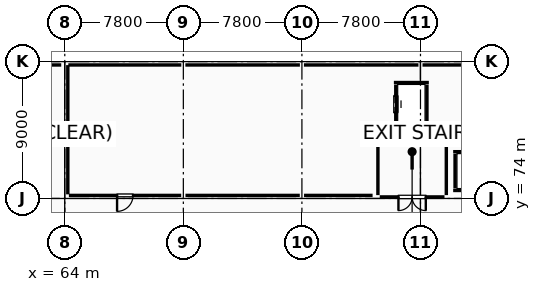
"""IFC4 building model, lengths in metres.
Left out: names, types, materials, properties, quantities, classifications, styles, units other than length and angle.
Written with IfcOpenShell. Run it as: python <this file> out.ifc"""

import sys

from ifc_helpers import new_model, si_unit, direction, frame, frame_2d, origin, origin_2d, place, context, subcontext, project, spatial, rectangle, hollow_rectangle, i_section, extrude, element, fill, save


model = new_model("IFC4")
c1 = context("Model", 3, precision=1e-05, world=origin(), true_north=direction((0.0, 1.0)))
c2 = subcontext(c1, "Body", "Model", "MODEL_VIEW")
j1 = project(units=[si_unit("LENGTHUNIT", "METRE"), si_unit("PLANEANGLEUNIT", "RADIAN")], contexts=[c1])
p1 = place(None, origin())
s1 = spatial("IfcSite", under=j1, at=p1, CompositionType="ELEMENT")
p2 = place(p1, origin())
s2 = spatial("IfcBuilding", under=s1, at=p2, CompositionType="ELEMENT")
p3 = place(p2, frame((0.0, 0.0, 15.0)))
s3 = spatial("IfcBuildingStorey", under=s2, at=p3, CompositionType="ELEMENT", Elevation=15.0)
p4 = place(p3, frame((64.0, 74.0, 0.0), z_axis=(0.0, 0.0, 1.0), x_axis=(1.0, 0.0, 0.0)))
e1 = element("IfcColumn", 1, at=p4, inside=s3, PredefinedType="COLUMN", context=c2, shape_type="SweptSolid", body=[
    extrude(i_section(OverallWidth=0.25, OverallDepth=0.45, WebThickness=0.011, FlangeThickness=0.014, FilletRadius=0.015, at=origin_2d()), origin(), (0.0, 0.0, 1.0), 4.8),
])
p5 = place(p3, frame((64.0, 83.0, 0.0), z_axis=(0.0, 0.0, 1.0), x_axis=(1.0, 0.0, 0.0)))
e2 = element("IfcColumn", 2, at=p5, inside=s3, PredefinedType="COLUMN", context=c2, shape_type="SweptSolid", body=[
    extrude(hollow_rectangle(XDim=0.45, YDim=0.45, WallThickness=0.02, at=origin_2d()), origin(), (0.0, 0.0, 1.0), 4.8),
])
for number, where, z_axis, x_axis in (
    (3, (71.8, 74.0, 0.0), (0.0, 0.0, 1.0), (1.0, 0.0, 0.0)),
    (4, (71.8, 83.0, 0.0), (0.0, 0.0, 1.0), (1.0, 0.0, 0.0)),
    (5, (79.6, 74.0, 0.0), (0.0, 0.0, 1.0), (1.0, 0.0, 0.0)),
    (6, (79.6, 83.0, 0.0), (0.0, 0.0, 1.0), (1.0, 0.0, 0.0)),
    (7, (87.4, 83.0, 0.0), (0.0, 0.0, 1.0), (1.0, 0.0, 0.0)),
):
    element("IfcColumn", number, at=place(p3, frame(where, z_axis=z_axis, x_axis=x_axis)), inside=s3, PredefinedType="COLUMN", context=c2, shape_type="SweptSolid", body=[
        extrude(i_section(OverallWidth=0.25, OverallDepth=0.45, WebThickness=0.011, FlangeThickness=0.014, FilletRadius=0.015, at=origin_2d()), origin(), (0.0, 0.0, 1.0), 4.8),
    ])
p6 = place(p3, frame((62.804, 82.78, 0.0), z_axis=(0.0, 0.0, 1.0), x_axis=(1.0, 0.0, 0.0)))
e8 = element("IfcWall", 8, at=p6, inside=s3, PredefinedType="STANDARD", context=c2, shape_type="SweptSolid", body=[
    extrude(rectangle(XDim=0.963, YDim=0.4, at=frame_2d((0.481, 0.0))), origin(), (0.0, 0.0, 1.0), 4.55),
])
p7 = place(p3, frame((64.233, 82.78, 0.0), z_axis=(0.0, 0.0, 1.0), x_axis=(1.0, 0.0, 0.0)))
e9 = element("IfcWall", 9, at=p7, inside=s3, PredefinedType="STANDARD", context=c2, shape_type="SweptSolid", body=[
    extrude(rectangle(XDim=7.434, YDim=0.4, at=frame_2d((3.717, 0.0))), origin(), (0.0, 0.0, 1.0), 3.685),
])
p8 = place(p3, frame((71.933, 82.78, 0.0), z_axis=(0.0, 0.0, 1.0), x_axis=(1.0, 0.0, 0.0)))
e10 = element("IfcWall", 10, at=p8, inside=s3, PredefinedType="STANDARD", context=c2, shape_type="SweptSolid", body=[
    extrude(rectangle(XDim=7.534, YDim=0.4, at=frame_2d((3.767, 0.0))), origin(), (0.0, 0.0, 1.0), 3.785),
])
p9 = place(p3, frame((79.733, 82.78, 0.0), z_axis=(0.0, 0.0, 1.0), x_axis=(1.0, 0.0, 0.0)))
e11 = element("IfcWall", 11, at=p9, inside=s3, PredefinedType="STANDARD", context=c2, shape_type="SweptSolid", body=[
    extrude(rectangle(XDim=7.534, YDim=0.4, at=frame_2d((3.767, 0.0))), origin(), (0.0, 0.0, 1.0), 3.885),
])
p10 = place(p3, frame((87.533, 82.78, 0.0), z_axis=(0.0, 0.0, 1.0), x_axis=(1.0, 0.0, 0.0)))
e12 = element("IfcWall", 12, at=p10, inside=s3, PredefinedType="STANDARD", context=c2, shape_type="SweptSolid", body=[
    extrude(rectangle(XDim=5.863, YDim=0.4, at=frame_2d((2.932, 0.0))), origin(), (0.0, 0.0, 1.0), 4.55),
])
p11 = place(p3, frame((89.55, 74.525, 0.0), z_axis=(0.0, 0.0, 1.0), x_axis=(1.0, 0.0, 0.0)))
e13 = element("IfcWall", 13, at=p11, inside=s3, PredefinedType="STANDARD", context=c2, shape_type="SweptSolid", body=[
    extrude(rectangle(XDim=2.5, YDim=0.25, at=frame_2d((1.25, 0.0))), origin(), (0.0, 0.0, 1.0), 4.54),
])
p12 = place(p11, frame((0.65, 0.0, 0.0)))
e14 = element("IfcOpeningElement", 14, at=p12, cuts=e13, PredefinedType="OPENING", context=c2, shape_type="SweptSolid", body=[
    extrude(rectangle(XDim=1.2, YDim=2.05, at=frame_2d((0.6, 1.025))), frame((0.0, 0.135, 0.0), z_axis=(0.0, -1.0, 0.0), x_axis=(1.0, 0.0, 0.0)), (0.0, 0.0, 1.0), 0.27),
])
p13 = place(p3, frame((92.05, 77.075, 0.0), z_axis=(0.0, 0.0, 1.0), x_axis=(-1.0, 0.0, 0.0)))
e15 = element("IfcWall", 15, at=p13, inside=s3, PredefinedType="STANDARD", context=c2, shape_type="SweptSolid", body=[
    extrude(rectangle(XDim=2.5, YDim=0.25, at=frame_2d((1.25, 0.0))), origin(), (0.0, 0.0, 1.0), 4.54),
])
p14 = place(p3, frame((89.675, 76.94, 0.0), z_axis=(0.0, 0.0, 1.0), x_axis=(0.0, -1.0, 0.0)))
e16 = element("IfcWall", 16, at=p14, inside=s3, PredefinedType="STANDARD", context=c2, shape_type="SweptSolid", body=[
    extrude(rectangle(XDim=2.28, YDim=0.25, at=frame_2d((1.14, 0.0))), origin(), (0.0, 0.0, 1.0), 4.54),
])
for number, where, z_axis, x_axis in (
    (17, (85.65, 78.775, 0.0), (0.0, 0.0, 1.0), (1.0, 0.0, 0.0)),
    (18, (87.95, 81.625, 0.0), (0.0, 0.0, 1.0), (-1.0, 0.0, 0.0)),
):
    element("IfcWall", number, at=place(p3, frame(where, z_axis=z_axis, x_axis=x_axis)), inside=s3, PredefinedType="STANDARD", context=c2, shape_type="SweptSolid", body=[
        extrude(rectangle(XDim=2.3, YDim=0.25, at=frame_2d((1.15, 0.0))), origin(), (0.0, 0.0, 1.0), 4.54),
    ])
p15 = place(p3, frame((87.825, 78.91, 0.0), z_axis=(0.0, 0.0, 1.0), x_axis=(0.0, 1.0, 0.0)))
e19 = element("IfcWall", 19, at=p15, inside=s3, PredefinedType="STANDARD", context=c2, shape_type="SweptSolid", body=[
    extrude(rectangle(XDim=2.58, YDim=0.25, at=frame_2d((1.29, 0.0))), origin(), (0.0, 0.0, 1.0), 4.54),
])
p16 = place(p3, frame((85.775, 81.49, 0.0), z_axis=(0.0, 0.0, 1.0), x_axis=(0.0, -1.0, 0.0)))
e20 = element("IfcWall", 20, at=p16, inside=s3, PredefinedType="STANDARD", context=c2, shape_type="SweptSolid", body=[
    extrude(rectangle(XDim=2.58, YDim=0.25, at=frame_2d((1.29, 0.0))), origin(), (0.0, 0.0, 1.0), 4.54),
])
p17 = place(p16, frame((0.74, 0.0, 0.0)))
e21 = element("IfcOpeningElement", 21, at=p17, cuts=e20, PredefinedType="OPENING", context=c2, shape_type="SweptSolid", body=[
    extrude(rectangle(XDim=1.1, YDim=2.15, at=frame_2d((0.55, 1.075))), frame((0.0, 0.135, 0.0), z_axis=(0.0, -1.0, 0.0), x_axis=(1.0, 0.0, 0.0)), (0.0, 0.0, 1.0), 0.27),
])
p18 = place(p3, frame((84.6, 74.22, 0.0), z_axis=(0.0, 0.0, 1.0), x_axis=(0.0, 1.0, 0.0)))
e22 = element("IfcWall", 22, at=p18, inside=s3, PredefinedType="PARTITIONING", context=c2, shape_type="SweptSolid", body=[
    extrude(rectangle(XDim=3.36, YDim=0.2, at=frame_2d((1.68, 0.0))), origin(), (0.0, 0.0, 1.0), 4.54),
])
p19 = place(p3, frame((84.72, 77.7, 0.0), z_axis=(0.0, 0.0, 1.0), x_axis=(1.0, 0.0, 0.0)))
e23 = element("IfcWall", 23, at=p19, inside=s3, PredefinedType="PARTITIONING", context=c2, shape_type="SweptSolid", body=[
    extrude(rectangle(XDim=4.26, YDim=0.2, at=frame_2d((2.13, 0.0))), origin(), (0.0, 0.0, 1.0), 4.54),
])
p20 = place(p3, frame((89.1, 77.58, 0.0), z_axis=(0.0, 0.0, 1.0), x_axis=(0.0, -1.0, 0.0)))
e24 = element("IfcWall", 24, at=p20, inside=s3, PredefinedType="PARTITIONING", context=c2, shape_type="SweptSolid", body=[
    extrude(rectangle(XDim=3.36, YDim=0.2, at=frame_2d((1.68, 0.0))), origin(), (0.0, 0.0, 1.0), 4.54),
])
p21 = place(p3, frame((88.98, 74.1, 0.0), z_axis=(0.0, 0.0, 1.0), x_axis=(-1.0, 0.0, 0.0)))
e25 = element("IfcWall", 25, at=p21, inside=s3, PredefinedType="PARTITIONING", context=c2, shape_type="SweptSolid", body=[
    extrude(rectangle(XDim=4.26, YDim=0.2, at=frame_2d((2.13, 0.0))), origin(), (0.0, 0.0, 1.0), 4.54),
])
p22 = place(p21, frame((1.23, 0.0, 0.0)))
e26 = element("IfcOpeningElement", 26, at=p22, cuts=e25, PredefinedType="OPENING", context=c2, shape_type="SweptSolid", body=[
    extrude(rectangle(XDim=1.8, YDim=2.15, at=frame_2d((0.9, 1.075))), frame((0.0, 0.11, 0.0), z_axis=(0.0, -1.0, 0.0), x_axis=(1.0, 0.0, 0.0)), (0.0, 0.0, 1.0), 0.22),
])
p23 = place(p3, frame((64.2, 74.27, 0.0), z_axis=(0.0, 0.0, 1.0), x_axis=(0.0, 1.0, 0.0)))
e27 = element("IfcWall", 27, at=p23, inside=s3, PredefinedType="PARTITIONING", context=c2, shape_type="SweptSolid", body=[
    extrude(rectangle(XDim=8.501, YDim=0.1, at=frame_2d((4.25, 0.0))), origin(), (0.0, 0.0, 1.0), 4.08),
])
p24 = place(p3, frame((84.25, 74.2, 0.0), z_axis=(0.0, 0.0, 1.0), x_axis=(-1.0, 0.0, 0.0)))
e28 = element("IfcWall", 28, at=p24, inside=s3, PredefinedType="PARTITIONING", context=c2, shape_type="SweptSolid", body=[
    extrude(rectangle(XDim=4.51, YDim=0.1, at=frame_2d((2.255, 0.0))), origin(), (0.0, 0.0, 1.0), 4.54),
])
p25 = place(p3, frame((79.46, 74.2, 0.0), z_axis=(0.0, 0.0, 1.0), x_axis=(-1.0, 0.0, 0.0)))
e29 = element("IfcWall", 29, at=p25, inside=s3, PredefinedType="PARTITIONING", context=c2, shape_type="SweptSolid", body=[
    extrude(rectangle(XDim=7.52, YDim=0.1, at=frame_2d((3.76, 0.0))), origin(), (0.0, 0.0, 1.0), 4.08),
])
p26 = place(p3, frame((71.66, 74.2, 0.0), z_axis=(0.0, 0.0, 1.0), x_axis=(-1.0, 0.0, 0.0)))
e30 = element("IfcWall", 30, at=p26, inside=s3, PredefinedType="PARTITIONING", context=c2, shape_type="SweptSolid", body=[
    extrude(rectangle(XDim=7.39, YDim=0.1, at=frame_2d((3.695, 0.0))), origin(), (0.0, 0.0, 1.0), 4.03),
])
p27 = place(p26, frame((3.17, 0.0, 0.0)))
e31 = element("IfcOpeningElement", 31, at=p27, cuts=e30, PredefinedType="OPENING", context=c2, shape_type="SweptSolid", body=[
    extrude(rectangle(XDim=1.05, YDim=2.15, at=frame_2d((0.525, 1.075))), frame((0.0, 0.06, 0.0), z_axis=(0.0, -1.0, 0.0), x_axis=(1.0, 0.0, 0.0)), (0.0, 0.0, 1.0), 0.12),
])
p28 = place(p17, origin())
e32 = element("IfcDoor", 32, at=p28, inside=s3, OperationType="DOUBLE_DOOR_SLIDING", PredefinedType="DOOR", context=c2, shape_type="SweptSolid", body=[
    extrude(rectangle(XDim=1.1, YDim=2.15, at=frame_2d((0.55, 1.075))), frame((0.0, 0.025, 0.0), z_axis=(0.0, -1.0, 0.0), x_axis=(1.0, 0.0, 0.0)), (0.0, 0.0, 1.0), 0.05),
])
fill(e21, e32)
p29 = place(p22, origin())
e33 = element("IfcDoor", 33, at=p29, inside=s3, OperationType="DOUBLE_DOOR_SINGLE_SWING", PredefinedType="DOOR", context=c2, shape_type="SweptSolid", body=[
    extrude(rectangle(XDim=1.8, YDim=2.15, at=frame_2d((0.9, 1.075))), frame((0.0, 0.025, 0.0), z_axis=(0.0, -1.0, 0.0), x_axis=(1.0, 0.0, 0.0)), (0.0, 0.0, 1.0), 0.05),
])
fill(e26, e33)
p30 = place(p27, origin())
e34 = element("IfcDoor", 34, at=p30, inside=s3, OperationType="SINGLE_SWING_RIGHT", PredefinedType="DOOR", context=c2, shape_type="SweptSolid", body=[
    extrude(rectangle(XDim=1.05, YDim=2.15, at=frame_2d((0.525, 1.075))), frame((0.0, 0.025, 0.0), z_axis=(0.0, -1.0, 0.0), x_axis=(1.0, 0.0, 0.0)), (0.0, 0.0, 1.0), 0.05),
])
fill(e31, e34)
save(model, sys.argv[1])
